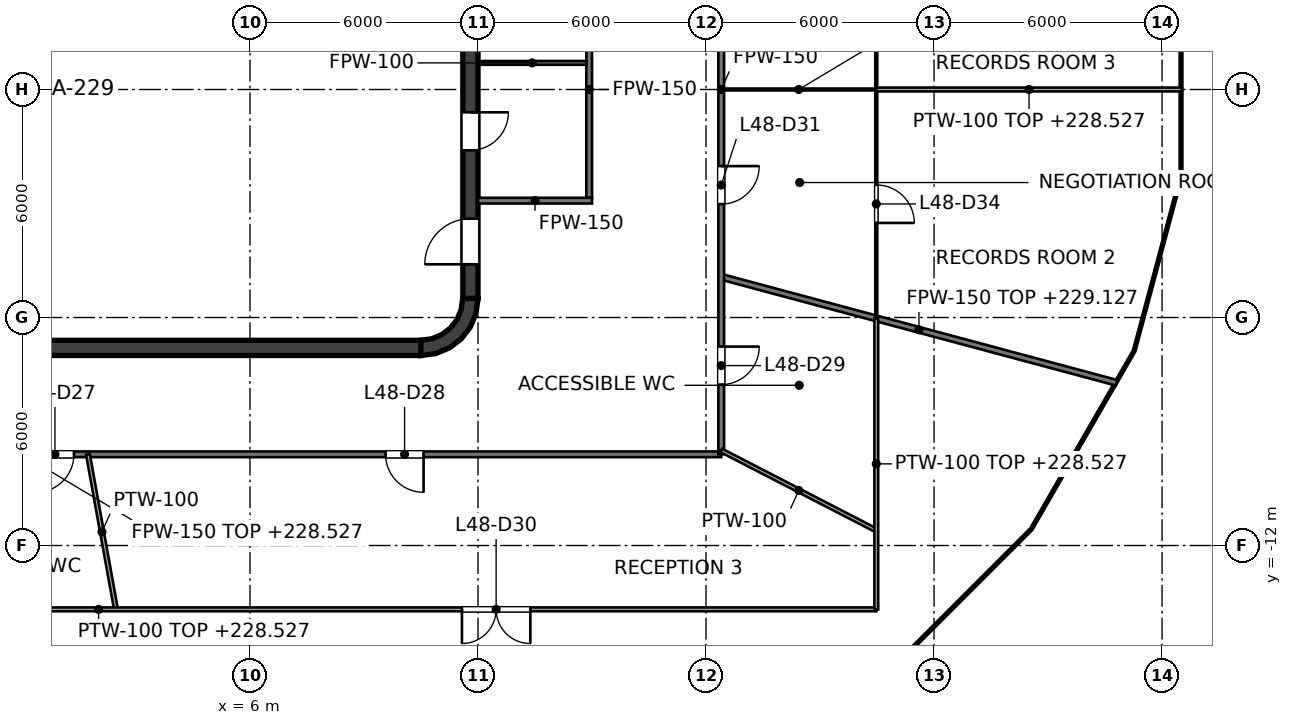
"""IFC4 building model, lengths in metres.
Left out: names, types, materials, properties, quantities, classifications, styles, units other than length and angle.
Written with IfcOpenShell. Run it as: python <this file> out.ifc"""

import sys

from ifc_helpers import new_model, si_unit, direction, frame, frame_2d, origin, place, context, subcontext, project, spatial, polyline, rectangle, outline, extrude, element, fill, save


model = new_model("IFC4")
c1 = context("Model", 3, precision=1e-05, world=origin(), true_north=direction((0.0, 1.0)))
c2 = subcontext(c1, "Body", "Model", "MODEL_VIEW")
j1 = project(units=[si_unit("LENGTHUNIT", "METRE"), si_unit("PLANEANGLEUNIT", "RADIAN")], contexts=[c1])
p1 = place(None, origin())
s1 = spatial("IfcSite", under=j1, at=p1, CompositionType="ELEMENT")
p2 = place(p1, origin())
s2 = spatial("IfcBuilding", under=s1, at=p2, CompositionType="ELEMENT")
p3 = place(p2, frame((0.0, 0.0, 225.6)))
s3 = spatial("IfcBuildingStorey", under=s2, at=p3, CompositionType="ELEMENT", Elevation=225.6)
p4 = place(p3, frame((-10.5, -6.8, 0.0), z_axis=(0.0, 0.0, 1.0), x_axis=(1.0, 0.0, 0.0)))
e1 = element("IfcWall", 1, at=p4, inside=s3, PredefinedType="SHEAR", context=c2, shape_type="SweptSolid", body=[
    extrude(rectangle(XDim=21.0, YDim=0.4, at=frame_2d((10.5, 0.0))), origin(), (0.0, 0.0, 1.0), 4.0),
])
p5 = place(p3, frame((11.8, -5.5, 0.0), z_axis=(0.0, 0.0, 1.0), x_axis=(0.0, 1.0, 0.0)))
e2 = element("IfcWall", 2, at=p5, inside=s3, PredefinedType="SHEAR", context=c2, shape_type="SweptSolid", body=[
    extrude(rectangle(XDim=11.0, YDim=0.4, at=frame_2d((5.5, 0.0))), origin(), (0.0, 0.0, 1.0), 4.0),
])
p6 = place(p5, frame((3.9, 0.0, 0.0)))
e3 = element("IfcOpeningElement", 3, at=p6, cuts=e2, PredefinedType="OPENING", context=c2, shape_type="SweptSolid", body=[
    extrude(rectangle(XDim=1.0, YDim=2.1, at=frame_2d((0.5, 1.05))), frame((0.0, 0.2, 0.0), z_axis=(0.0, -1.0, 0.0), x_axis=(1.0, 0.0, 0.0)), (0.0, 0.0, 1.0), 0.4),
])
p7 = place(p5, frame((6.8, 0.0, 0.0)))
e4 = element("IfcOpeningElement", 4, at=p7, cuts=e2, PredefinedType="OPENING", context=c2, shape_type="SweptSolid", body=[
    extrude(rectangle(XDim=1.0, YDim=2.1, at=frame_2d((0.5, 1.05))), frame((0.0, 0.2, 0.0), z_axis=(0.0, -1.0, 0.0), x_axis=(1.0, 0.0, 0.0)), (0.0, 0.0, 1.0), 0.4),
])
p8 = place(p5, frame((0.9, 0.0, 0.0)))
e5 = element("IfcOpeningElement", 5, at=p8, cuts=e2, PredefinedType="OPENING", context=c2, shape_type="SweptSolid", body=[
    extrude(rectangle(XDim=1.2, YDim=2.1, at=frame_2d((0.6, 1.05))), frame((0.0, 0.2, 0.0), z_axis=(0.0, -1.0, 0.0), x_axis=(1.0, 0.0, 0.0)), (0.0, 0.0, 1.0), 0.4),
])
p9 = place(p5, frame((8.9, 0.0, 0.0)))
e6 = element("IfcOpeningElement", 6, at=p9, cuts=e2, PredefinedType="OPENING", context=c2, shape_type="SweptSolid", body=[
    extrude(rectangle(XDim=1.2, YDim=2.1, at=frame_2d((0.6, 1.05))), frame((0.0, 0.2, 0.0), z_axis=(0.0, -1.0, 0.0), x_axis=(1.0, 0.0, 0.0)), (0.0, 0.0, 1.0), 0.4),
])
p10 = place(p3, origin())
e7 = element("IfcWall", 7, at=p10, inside=s3, PredefinedType="SHEAR", context=c2, shape_type="SweptSolid", body=[
    extrude(outline(polyline([(12.0, -5.5), (11.596, -5.5), (11.559, -5.784), (11.45, -6.048), (11.275, -6.275), (11.048, -6.45), (10.784, -6.559), (10.5, -6.596), (10.5, -7.0), (10.888, -6.949), (11.25, -6.799), (11.561, -6.561), (11.799, -6.25), (11.949, -5.888), (12.0, -5.5)])), origin(), (0.0, 0.0, 1.0), 4.0),
])
p11 = place(p3, frame((9.0, -6.6, 0.0), z_axis=(0.0, 0.0, 1.0), x_axis=(0.0, 1.0, 0.0)))
e8 = element("IfcWall", 8, at=p11, inside=s3, PredefinedType="SOLIDWALL", context=c2, shape_type="SweptSolid", body=[
    extrude(rectangle(XDim=2.5, YDim=0.25, at=frame_2d((1.25, 0.0))), origin(), (0.0, 0.0, 1.0), 3.85),
])
p12 = place(p11, frame((0.65, 0.0, 0.0)))
e9 = element("IfcOpeningElement", 9, at=p12, cuts=e8, PredefinedType="OPENING", context=c2, shape_type="SweptSolid", body=[
    extrude(rectangle(XDim=1.2, YDim=2.1, at=frame_2d((0.6, 1.05))), frame((0.0, 0.125, 0.0), z_axis=(0.0, -1.0, 0.0), x_axis=(1.0, 0.0, 0.0)), (0.0, 0.0, 1.0), 0.25),
])
p13 = place(p3, frame((3.15, -6.6, 0.0), z_axis=(0.0, 0.0, 1.0), x_axis=(0.0, 1.0, 0.0)))
e10 = element("IfcWall", 10, at=p13, inside=s3, PredefinedType="SOLIDWALL", context=c2, shape_type="SweptSolid", body=[
    extrude(rectangle(XDim=2.5, YDim=0.25, at=frame_2d((1.25, 0.0))), origin(), (0.0, 0.0, 1.0), 3.85),
])
p14 = place(p3, frame((-9.125, -1.525, 0.0), z_axis=(0.0, 0.0, 1.0), x_axis=(1.0, 0.0, 0.0)))
e11 = element("IfcWall", 11, at=p14, inside=s3, PredefinedType="SOLIDWALL", context=c2, shape_type="SweptSolid", body=[
    extrude(rectangle(XDim=18.25, YDim=0.25, at=frame_2d((9.125, 0.0))), origin(), (0.0, 0.0, 1.0), 3.85),
])
p15 = place(p14, frame((7.15, 0.0, 0.0)))
e12 = element("IfcOpeningElement", 12, at=p15, cuts=e11, PredefinedType="OPENING", context=c2, shape_type="SweptSolid", body=[
    extrude(rectangle(XDim=1.2, YDim=2.1, at=frame_2d((0.6, 1.05))), frame((0.0, 0.125, 0.0), z_axis=(0.0, -1.0, 0.0), x_axis=(1.0, 0.0, 0.0)), (0.0, 0.0, 1.0), 0.25),
])
p16 = place(p14, frame((10.2, 0.0, 0.0)))
e13 = element("IfcOpeningElement", 13, at=p16, cuts=e11, PredefinedType="OPENING", context=c2, shape_type="SweptSolid", body=[
    extrude(rectangle(XDim=1.2, YDim=2.1, at=frame_2d((0.6, 1.05))), frame((0.0, 0.125, 0.0), z_axis=(0.0, -1.0, 0.0), x_axis=(1.0, 0.0, 0.0)), (0.0, 0.0, 1.0), 0.25),
])
p17 = place(p14, frame((16.075, 0.0, 0.0)))
e14 = element("IfcOpeningElement", 14, at=p17, cuts=e11, PredefinedType="OPENING", context=c2, shape_type="SweptSolid", body=[
    extrude(rectangle(XDim=1.0, YDim=2.1, at=frame_2d((0.5, 1.05))), frame((0.0, 0.125, 0.0), z_axis=(0.0, -1.0, 0.0), x_axis=(1.0, 0.0, 0.0)), (0.0, 0.0, 1.0), 0.25),
])
p18 = place(p3, frame((-9.125, -3.975, 0.0), z_axis=(0.0, 0.0, 1.0), x_axis=(1.0, 0.0, 0.0)))
e15 = element("IfcWall", 15, at=p18, inside=s3, PredefinedType="SOLIDWALL", context=c2, shape_type="SweptSolid", body=[
    extrude(rectangle(XDim=12.4, YDim=0.25, at=frame_2d((6.2, 0.0))), origin(), (0.0, 0.0, 1.0), 3.85),
])
p19 = place(p18, frame((1.05, 0.0, 0.0)))
e16 = element("IfcOpeningElement", 16, at=p19, cuts=e15, PredefinedType="OPENING", context=c2, shape_type="SweptSolid", body=[
    extrude(rectangle(XDim=1.2, YDim=2.1, at=frame_2d((0.6, 1.05))), frame((0.0, 0.125, 0.0), z_axis=(0.0, -1.0, 0.0), x_axis=(1.0, 0.0, 0.0)), (0.0, 0.0, 1.0), 0.25),
])
p20 = place(p18, frame((4.1, 0.0, 0.0)))
e17 = element("IfcOpeningElement", 17, at=p20, cuts=e15, PredefinedType="OPENING", context=c2, shape_type="SweptSolid", body=[
    extrude(rectangle(XDim=1.2, YDim=2.1, at=frame_2d((0.6, 1.05))), frame((0.0, 0.125, 0.0), z_axis=(0.0, -1.0, 0.0), x_axis=(1.0, 0.0, 0.0)), (0.0, 0.0, 1.0), 0.25),
])
p21 = place(p3, frame((3.275, -3.975, 0.0), z_axis=(0.0, 0.0, 1.0), x_axis=(1.0, 0.0, 0.0)))
e18 = element("IfcWall", 18, at=p21, inside=s3, PredefinedType="SOLIDWALL", context=c2, shape_type="SweptSolid", body=[
    extrude(rectangle(XDim=5.85, YDim=0.25, at=frame_2d((2.925, 0.0))), origin(), (0.0, 0.0, 1.0), 3.85),
])
for number, where, z_axis, x_axis in (
    (19, (3.2, -3.85, 0.0), (0.0, 0.0, 1.0), (0.0, 1.0, 0.0)),
    (20, (5.9, -3.85, 0.0), (0.0, 0.0, 1.0), (0.0, 1.0, 0.0)),
    (21, (9.0, -3.85, 0.0), (0.0, 0.0, 1.0), (0.0, 1.0, 0.0)),
):
    element("IfcWall", number, at=place(p3, frame(where, z_axis=z_axis, x_axis=x_axis)), inside=s3, PredefinedType="SOLIDWALL", context=c2, shape_type="SweptSolid", body=[
        extrude(rectangle(XDim=2.2, YDim=0.25, at=frame_2d((1.1, 0.0))), origin(), (0.0, 0.0, 1.0), 3.85),
    ])
p22 = place(p3, frame((14.925, -2.85, 0.0), z_axis=(0.0, 0.0, 1.0), x_axis=(0.0, 1.0, 0.0)))
e22 = element("IfcWall", 22, at=p22, inside=s3, PredefinedType="PARTITIONING", context=c2, shape_type="SweptSolid", body=[
    extrude(rectangle(XDim=5.7, YDim=0.15, at=frame_2d((2.85, 0.0))), origin(), (0.0, 0.0, 1.0), 2.918),
])
p23 = place(p3, frame((12.0, -2.925, 0.0), z_axis=(0.0, 0.0, 1.0), x_axis=(1.0, 0.0, 0.0)))
e23 = element("IfcWall", 23, at=p23, inside=s3, PredefinedType="PARTITIONING", context=c2, shape_type="SweptSolid", body=[
    extrude(rectangle(XDim=3.0, YDim=0.15, at=frame_2d((1.5, 0.0))), origin(), (0.0, 0.0, 1.0), 2.918),
])
p24 = place(p3, frame((12.0, 0.7, 0.0), z_axis=(0.0, 0.0, 1.0), x_axis=(1.0, 0.0, 0.0)))
e24 = element("IfcWall", 24, at=p24, inside=s3, PredefinedType="PARTITIONING", context=c2, shape_type="SweptSolid", body=[
    extrude(rectangle(XDim=2.85, YDim=0.1, at=frame_2d((1.425, 0.0))), origin(), (0.0, 0.0, 1.0), 2.918),
])
p25 = place(p3, frame((18.4, -4.93, 0.0), z_axis=(0.0, 0.0, 1.0), x_axis=(0.965918203443, -0.258847492275, 0.0)))
e25 = element("IfcWall", 25, at=p25, inside=s3, PredefinedType="PARTITIONING", context=c2, shape_type="SweptSolid", body=[
    extrude(rectangle(XDim=10.771, YDim=0.15, at=frame_2d((5.386, 0.0))), origin(), (0.0, 0.0, 1.0), 3.527),
])
p26 = place(p3, frame((-18.4, -9.6, 0.0), z_axis=(0.0, 0.0, 1.0), x_axis=(1.0, 0.0, 0.0)))
e26 = element("IfcWall", 26, at=p26, inside=s3, PredefinedType="PARTITIONING", context=c2, shape_type="SweptSolid", body=[
    extrude(rectangle(XDim=36.8, YDim=0.15, at=frame_2d((18.4, 0.0))), origin(), (0.0, 0.0, 1.0), 2.927),
])
p27 = place(p26, frame((5.082, 0.0, 0.0)))
e27 = element("IfcOpeningElement", 27, at=p27, cuts=e26, PredefinedType="OPENING", context=c2, shape_type="SweptSolid", body=[
    extrude(rectangle(XDim=1.0, YDim=2.1, at=frame_2d((0.5, 1.05))), frame((0.0, 0.075, 0.0), z_axis=(0.0, -1.0, 0.0), x_axis=(1.0, 0.0, 0.0)), (0.0, 0.0, 1.0), 0.15),
])
p28 = place(p26, frame((11.135, 0.0, 0.0)))
e28 = element("IfcOpeningElement", 28, at=p28, cuts=e26, PredefinedType="OPENING", context=c2, shape_type="SweptSolid", body=[
    extrude(rectangle(XDim=1.0, YDim=2.1, at=frame_2d((0.5, 1.05))), frame((0.0, 0.075, 0.0), z_axis=(0.0, -1.0, 0.0), x_axis=(1.0, 0.0, 0.0)), (0.0, 0.0, 1.0), 0.15),
])
p29 = place(p26, frame((15.588, 0.0, 0.0)))
e29 = element("IfcOpeningElement", 29, at=p29, cuts=e26, PredefinedType="OPENING", context=c2, shape_type="SweptSolid", body=[
    extrude(rectangle(XDim=1.0, YDim=2.1, at=frame_2d((0.5, 1.05))), frame((0.0, 0.075, 0.0), z_axis=(0.0, -1.0, 0.0), x_axis=(1.0, 0.0, 0.0)), (0.0, 0.0, 1.0), 0.15),
])
p30 = place(p26, frame((18.768, 0.0, 0.0)))
e30 = element("IfcOpeningElement", 30, at=p30, cuts=e26, PredefinedType="OPENING", context=c2, shape_type="SweptSolid", body=[
    extrude(rectangle(XDim=1.0, YDim=2.1, at=frame_2d((0.5, 1.05))), frame((0.0, 0.075, 0.0), z_axis=(0.0, -1.0, 0.0), x_axis=(1.0, 0.0, 0.0)), (0.0, 0.0, 1.0), 0.15),
])
p31 = place(p26, frame((27.968, 0.0, 0.0)))
e31 = element("IfcOpeningElement", 31, at=p31, cuts=e26, PredefinedType="OPENING", context=c2, shape_type="SweptSolid", body=[
    extrude(rectangle(XDim=1.0, YDim=2.1, at=frame_2d((0.5, 1.05))), frame((0.0, 0.075, 0.0), z_axis=(0.0, -1.0, 0.0), x_axis=(1.0, 0.0, 0.0)), (0.0, 0.0, 1.0), 0.15),
])
p32 = place(p3, frame((18.4, -9.6, 0.0), z_axis=(0.0, 0.0, 1.0), x_axis=(0.0, 1.0, 0.0)))
e32 = element("IfcWall", 32, at=p32, inside=s3, PredefinedType="PARTITIONING", context=c2, shape_type="SweptSolid", body=[
    extrude(rectangle(XDim=19.2, YDim=0.15, at=frame_2d((9.6, 0.0))), origin(), (0.0, 0.0, 1.0), 2.918),
])
p33 = place(p32, frame((1.835, 0.0, 0.0)))
e33 = element("IfcOpeningElement", 33, at=p33, cuts=e32, PredefinedType="OPENING", context=c2, shape_type="SweptSolid", body=[
    extrude(rectangle(XDim=1.0, YDim=2.1, at=frame_2d((0.5, 1.05))), frame((0.0, 0.075, 0.0), z_axis=(0.0, -1.0, 0.0), x_axis=(1.0, 0.0, 0.0)), (0.0, 0.0, 1.0), 0.15),
])
p34 = place(p32, frame((6.584, 0.0, 0.0)))
e34 = element("IfcOpeningElement", 34, at=p34, cuts=e32, PredefinedType="OPENING", context=c2, shape_type="SweptSolid", body=[
    extrude(rectangle(XDim=1.0, YDim=2.1, at=frame_2d((0.5, 1.05))), frame((0.0, 0.075, 0.0), z_axis=(0.0, -1.0, 0.0), x_axis=(1.0, 0.0, 0.0)), (0.0, 0.0, 1.0), 0.15),
])
p35 = place(p32, frame((11.514, 0.0, 0.0)))
e35 = element("IfcOpeningElement", 35, at=p35, cuts=e32, PredefinedType="OPENING", context=c2, shape_type="SweptSolid", body=[
    extrude(rectangle(XDim=1.0, YDim=2.1, at=frame_2d((0.5, 1.05))), frame((0.0, 0.075, 0.0), z_axis=(0.0, -1.0, 0.0), x_axis=(1.0, 0.0, 0.0)), (0.0, 0.0, 1.0), 0.15),
])
p36 = place(p32, frame((16.365, 0.0, 0.0)))
e36 = element("IfcOpeningElement", 36, at=p36, cuts=e32, PredefinedType="OPENING", context=c2, shape_type="SweptSolid", body=[
    extrude(rectangle(XDim=1.0, YDim=2.1, at=frame_2d((0.5, 1.05))), frame((0.0, 0.075, 0.0), z_axis=(0.0, -1.0, 0.0), x_axis=(1.0, 0.0, 0.0)), (0.0, 0.0, 1.0), 0.15),
])
p37 = place(p3, frame((18.4, 0.0, 0.0), z_axis=(0.0, 0.0, 1.0), x_axis=(1.0, 0.0, 0.0)))
e37 = element("IfcWall", 37, at=p37, inside=s3, PredefinedType="PARTITIONING", context=c2, shape_type="SweptSolid", body=[
    extrude(rectangle(XDim=4.08, YDim=0.05, at=frame_2d((2.04, 0.0))), origin(), (0.0, 0.0, 1.0), 2.927),
])
p38 = place(p3, frame((22.48, -6.023, 0.0), z_axis=(0.0, 0.0, 1.0), x_axis=(0.0, 1.0, 0.0)))
e38 = element("IfcWall", 38, at=p38, inside=s3, PredefinedType="PARTITIONING", context=c2, shape_type="SweptSolid", body=[
    extrude(rectangle(XDim=19.002, YDim=0.05, at=frame_2d((9.501, 0.0))), origin(), (0.0, 0.0, 1.0), 2.918),
])
p39 = place(p38, frame((2.511, 0.0, 0.0)))
e39 = element("IfcOpeningElement", 39, at=p39, cuts=e38, PredefinedType="OPENING", context=c2, shape_type="SweptSolid", body=[
    extrude(rectangle(XDim=1.0, YDim=2.1, at=frame_2d((0.5, 1.05))), frame((0.0, 0.025, 0.0), z_axis=(0.0, -1.0, 0.0), x_axis=(1.0, 0.0, 0.0)), (0.0, 0.0, 1.0), 0.05),
])
p40 = place(p38, frame((8.534, 0.0, 0.0)))
e40 = element("IfcOpeningElement", 40, at=p40, cuts=e38, PredefinedType="OPENING", context=c2, shape_type="SweptSolid", body=[
    extrude(rectangle(XDim=1.0, YDim=2.1, at=frame_2d((0.5, 1.05))), frame((0.0, 0.025, 0.0), z_axis=(0.0, -1.0, 0.0), x_axis=(1.0, 0.0, 0.0)), (0.0, 0.0, 1.0), 0.05),
])
p41 = place(p38, frame((14.974, 0.0, 0.0)))
e41 = element("IfcOpeningElement", 41, at=p41, cuts=e38, PredefinedType="OPENING", context=c2, shape_type="SweptSolid", body=[
    extrude(rectangle(XDim=1.0, YDim=2.1, at=frame_2d((0.5, 1.05))), frame((0.0, 0.025, 0.0), z_axis=(0.0, -1.0, 0.0), x_axis=(1.0, 0.0, 0.0)), (0.0, 0.0, 1.0), 0.05),
])
p42 = place(p3, frame((1.736, -9.6, 0.0), z_axis=(0.0, 0.0, 1.0), x_axis=(0.178009628273, -0.984028745638, 0.0)))
e42 = element("IfcWall", 42, at=p42, inside=s3, PredefinedType="PARTITIONING", context=c2, shape_type="SweptSolid", body=[
    extrude(rectangle(XDim=4.146, YDim=0.1, at=frame_2d((2.073, 0.0))), origin(), (0.0, 0.0, 1.0), 3.85),
])
p43 = place(p3, frame((18.4, -9.497, 0.0), z_axis=(0.0, 0.0, 1.0), x_axis=(0.888610870054, -0.458661881587, 0.0)))
e43 = element("IfcWall", 43, at=p43, inside=s3, PredefinedType="PARTITIONING", context=c2, shape_type="SweptSolid", body=[
    extrude(rectangle(XDim=4.592, YDim=0.1, at=frame_2d((2.296, 0.0))), origin(), (0.0, 0.0, 1.0), 3.85),
])
p44 = place(p3, frame((-18.448, -13.68, 0.0), z_axis=(0.0, 0.0, 1.0), x_axis=(1.0, 0.0, 0.0)))
e44 = element("IfcWall", 44, at=p44, inside=s3, PredefinedType="PARTITIONING", context=c2, shape_type="SweptSolid", body=[
    extrude(rectangle(XDim=40.928, YDim=0.1, at=frame_2d((20.464, 0.0))), origin(), (0.0, 0.0, 1.0), 2.927),
])
p45 = place(p44, frame((14.203, 0.0, 0.0)))
e45 = element("IfcOpeningElement", 45, at=p45, cuts=e44, PredefinedType="OPENING", context=c2, shape_type="SweptSolid", body=[
    extrude(rectangle(XDim=1.8, YDim=2.1, at=frame_2d((0.9, 1.05))), frame((0.0, 0.05, 0.0), z_axis=(0.0, -1.0, 0.0), x_axis=(1.0, 0.0, 0.0)), (0.0, 0.0, 1.0), 0.1),
])
p46 = place(p44, frame((30.025, 0.0, 0.0)))
e46 = element("IfcOpeningElement", 46, at=p46, cuts=e44, PredefinedType="OPENING", context=c2, shape_type="SweptSolid", body=[
    extrude(rectangle(XDim=1.8, YDim=2.1, at=frame_2d((0.9, 1.05))), frame((0.0, 0.05, 0.0), z_axis=(0.0, -1.0, 0.0), x_axis=(1.0, 0.0, 0.0)), (0.0, 0.0, 1.0), 0.1),
])
p47 = place(p3, frame((22.48, 0.0, 0.0), z_axis=(0.0, 0.0, 1.0), x_axis=(1.0, 0.0, 0.0)))
e47 = element("IfcWall", 47, at=p47, inside=s3, PredefinedType="PARTITIONING", context=c2, shape_type="SweptSolid", body=[
    extrude(rectangle(XDim=8.039, YDim=0.1, at=frame_2d((4.02, 0.0))), origin(), (0.0, 0.0, 1.0), 2.927),
])
p48 = place(p3, frame((22.48, -13.68, 0.0), z_axis=(0.0, 0.0, 1.0), x_axis=(0.0, 1.0, 0.0)))
e48 = element("IfcWall", 48, at=p48, inside=s3, PredefinedType="PARTITIONING", context=c2, shape_type="SweptSolid", body=[
    extrude(rectangle(XDim=7.657, YDim=0.1, at=frame_2d((3.829, 0.0))), origin(), (0.0, 0.0, 1.0), 2.927),
])
p49 = place(p16, origin())
e49 = element("IfcDoor", 49, at=p49, inside=s3, OperationType="DOUBLE_DOOR_SLIDING", PredefinedType="DOOR", context=c2, shape_type="SweptSolid", body=[
    extrude(rectangle(XDim=1.2, YDim=2.1, at=frame_2d((0.6, 1.05))), frame((0.0, 0.025, 0.0), z_axis=(0.0, -1.0, 0.0), x_axis=(1.0, 0.0, 0.0)), (0.0, 0.0, 1.0), 0.05),
])
fill(e13, e49)
p50 = place(p12, origin())
e50 = element("IfcDoor", 50, at=p50, inside=s3, OperationType="SINGLE_SWING_LEFT", PredefinedType="DOOR", context=c2, shape_type="SweptSolid", body=[
    extrude(rectangle(XDim=1.2, YDim=2.1, at=frame_2d((0.6, 1.05))), frame((0.0, 0.025, 0.0), z_axis=(0.0, -1.0, 0.0), x_axis=(1.0, 0.0, 0.0)), (0.0, 0.0, 1.0), 0.05),
])
fill(e9, e50)
p51 = place(p17, origin())
e51 = element("IfcDoor", 51, at=p51, inside=s3, OperationType="SINGLE_SWING_RIGHT", PredefinedType="DOOR", context=c2, shape_type="SweptSolid", body=[
    extrude(rectangle(XDim=1.0, YDim=2.1, at=frame_2d((0.5, 1.05))), frame((0.0, 0.025, 0.0), z_axis=(0.0, -1.0, 0.0), x_axis=(1.0, 0.0, 0.0)), (0.0, 0.0, 1.0), 0.05),
])
fill(e14, e51)
p52 = place(p6, origin())
e52 = element("IfcDoor", 52, at=p52, inside=s3, OperationType="SINGLE_SWING_RIGHT", PredefinedType="DOOR", context=c2, shape_type="SweptSolid", body=[
    extrude(rectangle(XDim=1.0, YDim=2.1, at=frame_2d((0.5, 1.05))), frame((0.0, 0.025, 0.0), z_axis=(0.0, -1.0, 0.0), x_axis=(1.0, 0.0, 0.0)), (0.0, 0.0, 1.0), 0.05),
])
fill(e3, e52)
p53 = place(p8, origin())
e53 = element("IfcDoor", 53, at=p53, inside=s3, OperationType="SINGLE_SWING_LEFT", PredefinedType="DOOR", context=c2, shape_type="SweptSolid", body=[
    extrude(rectangle(XDim=1.2, YDim=2.1, at=frame_2d((0.6, 1.05))), frame((0.0, 0.025, 0.0), z_axis=(0.0, -1.0, 0.0), x_axis=(1.0, 0.0, 0.0)), (0.0, 0.0, 1.0), 0.05),
])
fill(e5, e53)
p54 = place(p30, origin())
e54 = element("IfcDoor", 54, at=p54, inside=s3, OperationType="SINGLE_SWING_LEFT", PredefinedType="DOOR", context=c2, shape_type="SweptSolid", body=[
    extrude(rectangle(XDim=1.0, YDim=2.1, at=frame_2d((0.5, 1.05))), frame((0.0, 0.025, 0.0), z_axis=(0.0, -1.0, 0.0), x_axis=(1.0, 0.0, 0.0)), (0.0, 0.0, 1.0), 0.05),
])
fill(e30, e54)
p55 = place(p31, origin())
e55 = element("IfcDoor", 55, at=p55, inside=s3, OperationType="SINGLE_SWING_RIGHT", PredefinedType="DOOR", context=c2, shape_type="SweptSolid", body=[
    extrude(rectangle(XDim=1.0, YDim=2.1, at=frame_2d((0.5, 1.05))), frame((0.0, 0.025, 0.0), z_axis=(0.0, -1.0, 0.0), x_axis=(1.0, 0.0, 0.0)), (0.0, 0.0, 1.0), 0.05),
])
fill(e31, e55)
p56 = place(p33, origin())
e56 = element("IfcDoor", 56, at=p56, inside=s3, OperationType="SINGLE_SWING_RIGHT", PredefinedType="DOOR", context=c2, shape_type="SweptSolid", body=[
    extrude(rectangle(XDim=1.0, YDim=2.1, at=frame_2d((0.5, 1.05))), frame((0.0, 0.025, 0.0), z_axis=(0.0, -1.0, 0.0), x_axis=(1.0, 0.0, 0.0)), (0.0, 0.0, 1.0), 0.05),
])
fill(e33, e56)
p57 = place(p46, origin())
e57 = element("IfcDoor", 57, at=p57, inside=s3, OperationType="DOUBLE_DOOR_SINGLE_SWING", PredefinedType="DOOR", context=c2, shape_type="SweptSolid", body=[
    extrude(rectangle(XDim=1.8, YDim=2.1, at=frame_2d((0.9, 1.05))), frame((0.0, 0.025, 0.0), z_axis=(0.0, -1.0, 0.0), x_axis=(1.0, 0.0, 0.0)), (0.0, 0.0, 1.0), 0.05),
])
fill(e46, e57)
p58 = place(p34, origin())
e58 = element("IfcDoor", 58, at=p58, inside=s3, OperationType="SINGLE_SWING_RIGHT", PredefinedType="DOOR", context=c2, shape_type="SweptSolid", body=[
    extrude(rectangle(XDim=1.0, YDim=2.1, at=frame_2d((0.5, 1.05))), frame((0.0, 0.025, 0.0), z_axis=(0.0, -1.0, 0.0), x_axis=(1.0, 0.0, 0.0)), (0.0, 0.0, 1.0), 0.05),
])
fill(e34, e58)
p59 = place(p39, origin())
e59 = element("IfcDoor", 59, at=p59, inside=s3, OperationType="SINGLE_SWING_LEFT", PredefinedType="DOOR", context=c2, shape_type="SweptSolid", body=[
    extrude(rectangle(XDim=1.0, YDim=2.1, at=frame_2d((0.5, 1.05))), frame((0.0, 0.025, 0.0), z_axis=(0.0, -1.0, 0.0), x_axis=(1.0, 0.0, 0.0)), (0.0, 0.0, 1.0), 0.05),
])
fill(e39, e59)
save(model, sys.argv[1])
